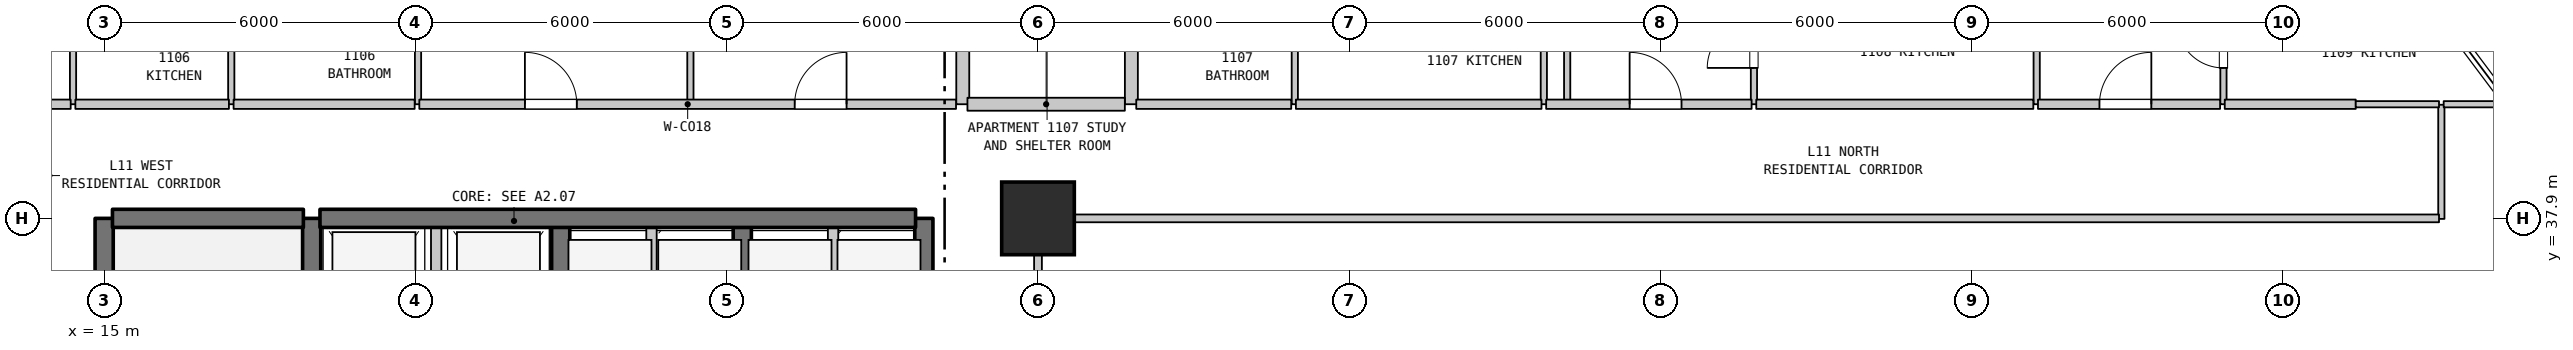
"""IFC4 building model, lengths in metres.
Left out: names, types, materials, properties, quantities, classifications, styles, units other than length and angle.
Written with IfcOpenShell. Run it as: python <this file> out.ifc"""

import sys

from ifc_helpers import new_model, si_unit, direction, frame, frame_2d, origin, origin_2d, place, context, subcontext, project, spatial, rectangle, extrude, element, fill, save


model = new_model("IFC4")
c1 = context("Model", 3, precision=1e-05, world=origin(), true_north=direction((0.0, 1.0)))
c2 = subcontext(c1, "Body", "Model", "MODEL_VIEW")
j1 = project(units=[si_unit("LENGTHUNIT", "METRE"), si_unit("PLANEANGLEUNIT", "RADIAN")], contexts=[c1])
p1 = place(None, origin())
s1 = spatial("IfcSite", under=j1, at=p1, CompositionType="ELEMENT")
p2 = place(p1, origin())
s2 = spatial("IfcBuilding", under=s1, at=p2, CompositionType="ELEMENT")
p3 = place(p2, frame((0.0, 0.0, 49.9)))
s3 = spatial("IfcBuildingStorey", under=s2, at=p3, CompositionType="ELEMENT", Elevation=49.9)
p4 = place(p3, frame((33.0, 37.9, 0.0), z_axis=(0.0, 0.0, 1.0), x_axis=(1.0, 0.0, 0.0)))
e1 = element("IfcColumn", 1, at=p4, inside=s3, PredefinedType="COLUMN", context=c2, shape_type="SweptSolid", body=[
    extrude(rectangle(XDim=1.4, YDim=1.4, at=origin_2d()), origin(), (0.0, 0.0, 1.0), 3.7),
])
p5 = place(p3, frame((14.4, 40.1, 0.0), z_axis=(0.0, 0.0, 1.0), x_axis=(0.0, 1.0, 0.0)))
e2 = element("IfcWall", 2, at=p5, inside=s3, PredefinedType="PARTITIONING", context=c2, shape_type="SweptSolid", body=[
    extrude(rectangle(XDim=2.3, YDim=0.12, at=frame_2d((1.15, 0.0))), origin(), (0.0, 0.0, 1.0), 3.385),
])
p6 = place(p3, frame((15.0, 31.1, 0.0), z_axis=(0.0, 0.0, 1.0), x_axis=(0.0, 1.0, 0.0)))
e3 = element("IfcWall", 3, at=p6, inside=s3, PredefinedType="SHEAR", context=c2, shape_type="SweptSolid", body=[
    extrude(rectangle(XDim=6.8, YDim=0.35, at=frame_2d((3.4, 0.0))), origin(), (0.0, 0.0, 1.0), 3.385),
])
p7 = place(p3, frame((17.45, 40.1, 0.0), z_axis=(0.0, 0.0, 1.0), x_axis=(0.0, 1.0, 0.0)))
e4 = element("IfcWall", 4, at=p7, inside=s3, PredefinedType="PARTITIONING", context=c2, shape_type="SweptSolid", body=[
    extrude(rectangle(XDim=2.3, YDim=0.12, at=frame_2d((1.15, 0.0))), origin(), (0.0, 0.0, 1.0), 3.385),
])
p8 = place(p3, frame((19.0, 35.0, 0.0), z_axis=(0.0, 0.0, 1.0), x_axis=(0.0, 1.0, 0.0)))
e5 = element("IfcWall", 5, at=p8, inside=s3, PredefinedType="SHEAR", context=c2, shape_type="SweptSolid", body=[
    extrude(rectangle(XDim=2.9, YDim=0.35, at=frame_2d((1.45, 0.0))), origin(), (0.0, 0.0, 1.0), 3.385),
])
p9 = place(p3, frame((21.05, 40.1, 0.0), z_axis=(0.0, 0.0, 1.0), x_axis=(0.0, 1.0, 0.0)))
e6 = element("IfcWall", 6, at=p9, inside=s3, PredefinedType="PARTITIONING", context=c2, shape_type="SweptSolid", body=[
    extrude(rectangle(XDim=2.3, YDim=0.12, at=frame_2d((1.15, 0.0))), origin(), (0.0, 0.0, 1.0), 3.025),
])
p10 = place(p3, frame((21.4, 35.0, 0.0), z_axis=(0.0, 0.0, 1.0), x_axis=(0.0, 1.0, 0.0)))
e7 = element("IfcWall", 7, at=p10, inside=s3, PredefinedType="STANDARD", context=c2, shape_type="SweptSolid", body=[
    extrude(rectangle(XDim=2.9, YDim=0.2, at=frame_2d((1.45, 0.0))), origin(), (0.0, 0.0, 1.0), 3.385),
])
p11 = place(p3, frame((23.8, 35.0, 0.0), z_axis=(0.0, 0.0, 1.0), x_axis=(0.0, 1.0, 0.0)))
e8 = element("IfcWall", 8, at=p11, inside=s3, PredefinedType="SHEAR", context=c2, shape_type="SweptSolid", body=[
    extrude(rectangle(XDim=2.9, YDim=0.35, at=frame_2d((1.45, 0.0))), origin(), (0.0, 0.0, 1.0), 3.385),
])
p12 = place(p3, frame((25.55, 35.0, 0.0), z_axis=(0.0, 0.0, 1.0), x_axis=(0.0, 1.0, 0.0)))
e9 = element("IfcWall", 9, at=p12, inside=s3, PredefinedType="STANDARD", context=c2, shape_type="SweptSolid", body=[
    extrude(rectangle(XDim=2.9, YDim=0.2, at=frame_2d((1.45, 0.0))), origin(), (0.0, 0.0, 1.0), 3.385),
])
p13 = place(p3, frame((26.3, 40.1, 0.0), z_axis=(0.0, 0.0, 1.0), x_axis=(0.0, 1.0, 0.0)))
e10 = element("IfcWall", 10, at=p13, inside=s3, PredefinedType="PARTITIONING", context=c2, shape_type="SweptSolid", body=[
    extrude(rectangle(XDim=2.05, YDim=0.12, at=frame_2d((1.025, 0.0))), origin(), (0.0, 0.0, 1.0), 3.385),
])
p14 = place(p3, frame((27.3, 35.0, 0.0), z_axis=(0.0, 0.0, 1.0), x_axis=(0.0, 1.0, 0.0)))
e11 = element("IfcWall", 11, at=p14, inside=s3, PredefinedType="SHEAR", context=c2, shape_type="SweptSolid", body=[
    extrude(rectangle(XDim=2.9, YDim=0.35, at=frame_2d((1.45, 0.0))), origin(), (0.0, 0.0, 1.0), 3.385),
])
p15 = place(p3, frame((29.05, 35.0, 0.0), z_axis=(0.0, 0.0, 1.0), x_axis=(0.0, 1.0, 0.0)))
e12 = element("IfcWall", 12, at=p15, inside=s3, PredefinedType="STANDARD", context=c2, shape_type="SweptSolid", body=[
    extrude(rectangle(XDim=2.9, YDim=0.2, at=frame_2d((1.45, 0.0))), origin(), (0.0, 0.0, 1.0), 3.385),
])
p16 = place(p3, frame((30.8, 35.0, 0.0), z_axis=(0.0, 0.0, 1.0), x_axis=(0.0, 1.0, 0.0)))
e13 = element("IfcWall", 13, at=p16, inside=s3, PredefinedType="SHEAR", context=c2, shape_type="SweptSolid", body=[
    extrude(rectangle(XDim=2.9, YDim=0.35, at=frame_2d((1.45, 0.0))), origin(), (0.0, 0.0, 1.0), 3.385),
])
p17 = place(p3, frame((31.55, 40.1, 0.0), z_axis=(0.0, 0.0, 1.0), x_axis=(0.0, 1.0, 0.0)))
e14 = element("IfcWall", 14, at=p17, inside=s3, PredefinedType="STANDARD", context=c2, shape_type="SweptSolid", body=[
    extrude(rectangle(XDim=2.3, YDim=0.25, at=frame_2d((1.15, 0.0))), origin(), (0.0, 0.0, 1.0), 3.385),
])
p18 = place(p3, frame((33.0, 27.91, 0.0), z_axis=(0.0, 0.0, 1.0), x_axis=(0.0, 1.0, 0.0)))
e15 = element("IfcWall", 15, at=p18, inside=s3, PredefinedType="STANDARD", context=c2, shape_type="SweptSolid", body=[
    extrude(rectangle(XDim=9.98, YDim=0.15, at=frame_2d((4.99, 0.0))), origin(), (0.0, 0.0, 1.0), 2.885),
])
p19 = place(p3, frame((34.8, 40.1, 0.0), z_axis=(0.0, 0.0, 1.0), x_axis=(0.0, 1.0, 0.0)))
e16 = element("IfcWall", 16, at=p19, inside=s3, PredefinedType="STANDARD", context=c2, shape_type="SweptSolid", body=[
    extrude(rectangle(XDim=2.3, YDim=0.25, at=frame_2d((1.15, 0.0))), origin(), (0.0, 0.0, 1.0), 3.385),
])
for number, where, z_axis, x_axis in (
    (17, (37.95, 40.1, 0.0), (0.0, 0.0, 1.0), (0.0, 1.0, 0.0)),
    (18, (42.75, 40.1, 0.0), (0.0, 0.0, 1.0), (0.0, 1.0, 0.0)),
):
    element("IfcWall", number, at=place(p3, frame(where, z_axis=z_axis, x_axis=x_axis)), inside=s3, PredefinedType="PARTITIONING", context=c2, shape_type="SweptSolid", body=[
        extrude(rectangle(XDim=2.3, YDim=0.12, at=frame_2d((1.15, 0.0))), origin(), (0.0, 0.0, 1.0), 3.385),
    ])
p20 = place(p3, frame((43.2, 40.1, 0.0), z_axis=(0.0, 0.0, 1.0), x_axis=(0.0, 1.0, 0.0)))
e19 = element("IfcWall", 19, at=p20, inside=s3, PredefinedType="PARTITIONING", context=c2, shape_type="SweptSolid", body=[
    extrude(rectangle(XDim=13.79, YDim=0.12, at=frame_2d((6.895, 0.0))), origin(), (0.0, 0.0, 1.0), 3.385),
])
p21 = place(p3, frame((46.8, 40.1, 0.0), z_axis=(0.0, 0.0, 1.0), x_axis=(0.0, 1.0, 0.0)))
e20 = element("IfcWall", 20, at=p21, inside=s3, PredefinedType="PARTITIONING", context=c2, shape_type="SweptSolid", body=[
    extrude(rectangle(XDim=2.3, YDim=0.12, at=frame_2d((1.15, 0.0))), origin(), (0.0, 0.0, 1.0), 3.385),
])
p22 = place(p21, frame((0.7, 0.0, 0.0)))
e21 = element("IfcOpeningElement", 21, at=p22, cuts=e20, PredefinedType="OPENING", context=c2, shape_type="SweptSolid", body=[
    extrude(rectangle(XDim=0.9, YDim=2.15, at=frame_2d((0.45, 1.075))), frame((0.0, 0.07, 0.0), z_axis=(0.0, -1.0, 0.0), x_axis=(1.0, 0.0, 0.0)), (0.0, 0.0, 1.0), 0.14),
])
p23 = place(p3, frame((52.25, 40.1, 0.0), z_axis=(0.0, 0.0, 1.0), x_axis=(0.0, 1.0, 0.0)))
e22 = element("IfcWall", 22, at=p23, inside=s3, PredefinedType="PARTITIONING", context=c2, shape_type="SweptSolid", body=[
    extrude(rectangle(XDim=2.3, YDim=0.12, at=frame_2d((1.15, 0.0))), origin(), (0.0, 0.0, 1.0), 3.385),
])
p24 = place(p3, frame((55.85, 40.1, 0.0), z_axis=(0.0, 0.0, 1.0), x_axis=(0.0, 1.0, 0.0)))
e23 = element("IfcWall", 23, at=p24, inside=s3, PredefinedType="PARTITIONING", context=c2, shape_type="SweptSolid", body=[
    extrude(rectangle(XDim=2.3, YDim=0.12, at=frame_2d((1.15, 0.0))), origin(), (0.0, 0.0, 1.0), 3.385),
])
p25 = place(p24, frame((0.7, 0.0, 0.0)))
e24 = element("IfcOpeningElement", 24, at=p25, cuts=e23, PredefinedType="OPENING", context=c2, shape_type="SweptSolid", body=[
    extrude(rectangle(XDim=0.9, YDim=2.15, at=frame_2d((0.45, 1.075))), frame((0.0, 0.07, 0.0), z_axis=(0.0, -1.0, 0.0), x_axis=(1.0, 0.0, 0.0)), (0.0, 0.0, 1.0), 0.14),
])
p26 = place(p3, frame((60.05, 37.89, 0.0), z_axis=(0.0, 0.0, 1.0), x_axis=(0.0, 1.0, 0.0)))
e25 = element("IfcWall", 25, at=p26, inside=s3, PredefinedType="PARTITIONING", context=c2, shape_type="SweptSolid", body=[
    extrude(rectangle(XDim=2.2, YDim=0.12, at=frame_2d((1.1, 0.0))), origin(), (0.0, 0.0, 1.0), 3.385),
])
p27 = place(p3, frame((15.16, 37.9, 0.0), z_axis=(0.0, 0.0, 1.0), x_axis=(1.0, 0.0, 0.0)))
e26 = element("IfcWall", 26, at=p27, inside=s3, PredefinedType="SHEAR", context=c2, shape_type="SweptSolid", body=[
    extrude(rectangle(XDim=3.68, YDim=0.35, at=frame_2d((1.84, 0.0))), origin(), (0.0, 0.0, 1.0), 3.385),
])
p28 = place(p3, frame((19.16, 37.9, 0.0), z_axis=(0.0, 0.0, 1.0), x_axis=(1.0, 0.0, 0.0)))
e27 = element("IfcWall", 27, at=p28, inside=s3, PredefinedType="SHEAR", context=c2, shape_type="SweptSolid", body=[
    extrude(rectangle(XDim=11.48, YDim=0.35, at=frame_2d((5.74, 0.0))), origin(), (0.0, 0.0, 1.0), 3.385),
])
p29 = place(p3, frame((33.07, 37.9, 0.0), z_axis=(0.0, 0.0, 1.0), x_axis=(1.0, 0.0, 0.0)))
e28 = element("IfcWall", 28, at=p29, inside=s3, PredefinedType="STANDARD", context=c2, shape_type="SweptSolid", body=[
    extrude(rectangle(XDim=26.935, YDim=0.15, at=frame_2d((13.467, 0.0))), origin(), (0.0, 0.0, 1.0), 3.385),
])
p30 = place(p3, frame((12.875, 40.1, 0.0), z_axis=(0.0, 0.0, 1.0), x_axis=(1.0, 0.0, 0.0)))
e29 = element("IfcWall", 29, at=p30, inside=s3, PredefinedType="STANDARD", context=c2, shape_type="SweptSolid", body=[
    extrude(rectangle(XDim=1.48, YDim=0.18, at=frame_2d((0.74, 0.0))), origin(), (0.0, 0.0, 1.0), 3.385),
])
p31 = place(p3, frame((14.445, 40.1, 0.0), z_axis=(0.0, 0.0, 1.0), x_axis=(1.0, 0.0, 0.0)))
e30 = element("IfcWall", 30, at=p31, inside=s3, PredefinedType="STANDARD", context=c2, shape_type="SweptSolid", body=[
    extrude(rectangle(XDim=2.96, YDim=0.18, at=frame_2d((1.48, 0.0))), origin(), (0.0, 0.0, 1.0), 3.385),
])
p32 = place(p3, frame((17.495, 40.1, 0.0), z_axis=(0.0, 0.0, 1.0), x_axis=(1.0, 0.0, 0.0)))
e31 = element("IfcWall", 31, at=p32, inside=s3, PredefinedType="STANDARD", context=c2, shape_type="SweptSolid", body=[
    extrude(rectangle(XDim=3.49, YDim=0.18, at=frame_2d((1.745, 0.0))), origin(), (0.0, 0.0, 1.0), 3.385),
])
p33 = place(p3, frame((21.075, 40.1, 0.0), z_axis=(0.0, 0.0, 1.0), x_axis=(1.0, 0.0, 0.0)))
e32 = element("IfcWall", 32, at=p33, inside=s3, PredefinedType="STANDARD", context=c2, shape_type="SweptSolid", body=[
    extrude(rectangle(XDim=10.345, YDim=0.18, at=frame_2d((5.172, 0.0))), origin(), (0.0, 0.0, 1.0), 3.385),
])
p34 = place(p33, frame((2.035, 0.0, 0.0)))
e33 = element("IfcOpeningElement", 33, at=p34, cuts=e32, PredefinedType="OPENING", context=c2, shape_type="SweptSolid", body=[
    extrude(rectangle(XDim=1.0, YDim=2.15, at=frame_2d((0.5, 1.075))), frame((0.0, 0.1, 0.0), z_axis=(0.0, -1.0, 0.0), x_axis=(1.0, 0.0, 0.0)), (0.0, 0.0, 1.0), 0.2),
])
p35 = place(p33, frame((7.235, 0.0, 0.0)))
e34 = element("IfcOpeningElement", 34, at=p35, cuts=e32, PredefinedType="OPENING", context=c2, shape_type="SweptSolid", body=[
    extrude(rectangle(XDim=1.0, YDim=2.15, at=frame_2d((0.5, 1.075))), frame((0.0, 0.1, 0.0), z_axis=(0.0, -1.0, 0.0), x_axis=(1.0, 0.0, 0.0)), (0.0, 0.0, 1.0), 0.2),
])
p36 = place(p3, frame((31.64, 40.1, 0.0), z_axis=(0.0, 0.0, 1.0), x_axis=(1.0, 0.0, 0.0)))
e35 = element("IfcWall", 35, at=p36, inside=s3, PredefinedType="STANDARD", context=c2, shape_type="SweptSolid", body=[
    extrude(rectangle(XDim=3.034, YDim=0.25, at=frame_2d((1.517, 0.0))), origin(), (0.0, 0.0, 1.0), 3.385),
])
p37 = place(p3, frame((34.894, 40.1, 0.0), z_axis=(0.0, 0.0, 1.0), x_axis=(1.0, 0.0, 0.0)))
e36 = element("IfcWall", 36, at=p37, inside=s3, PredefinedType="STANDARD", context=c2, shape_type="SweptSolid", body=[
    extrude(rectangle(XDim=2.987, YDim=0.18, at=frame_2d((1.494, 0.0))), origin(), (0.0, 0.0, 1.0), 3.385),
])
p38 = place(p3, frame((37.971, 40.1, 0.0), z_axis=(0.0, 0.0, 1.0), x_axis=(1.0, 0.0, 0.0)))
e37 = element("IfcWall", 37, at=p38, inside=s3, PredefinedType="STANDARD", context=c2, shape_type="SweptSolid", body=[
    extrude(rectangle(XDim=4.734, YDim=0.18, at=frame_2d((2.367, 0.0))), origin(), (0.0, 0.0, 1.0), 3.385),
])
p39 = place(p3, frame((42.795, 40.1, 0.0), z_axis=(0.0, 0.0, 1.0), x_axis=(1.0, 0.0, 0.0)))
e38 = element("IfcWall", 38, at=p39, inside=s3, PredefinedType="STANDARD", context=c2, shape_type="SweptSolid", body=[
    extrude(rectangle(XDim=3.96, YDim=0.18, at=frame_2d((1.98, 0.0))), origin(), (0.0, 0.0, 1.0), 3.385),
])
p40 = place(p39, frame((1.609, 0.0, 0.0)))
e39 = element("IfcOpeningElement", 39, at=p40, cuts=e38, PredefinedType="OPENING", context=c2, shape_type="SweptSolid", body=[
    extrude(rectangle(XDim=1.0, YDim=2.15, at=frame_2d((0.5, 1.075))), frame((0.0, 0.1, 0.0), z_axis=(0.0, -1.0, 0.0), x_axis=(1.0, 0.0, 0.0)), (0.0, 0.0, 1.0), 0.2),
])
p41 = place(p3, frame((46.845, 40.1, 0.0), z_axis=(0.0, 0.0, 1.0), x_axis=(1.0, 0.0, 0.0)))
e40 = element("IfcWall", 40, at=p41, inside=s3, PredefinedType="STANDARD", context=c2, shape_type="SweptSolid", body=[
    extrude(rectangle(XDim=5.34, YDim=0.18, at=frame_2d((2.67, 0.0))), origin(), (0.0, 0.0, 1.0), 3.385),
])
p42 = place(p3, frame((52.275, 40.1, 0.0), z_axis=(0.0, 0.0, 1.0), x_axis=(1.0, 0.0, 0.0)))
e41 = element("IfcWall", 41, at=p42, inside=s3, PredefinedType="STANDARD", context=c2, shape_type="SweptSolid", body=[
    extrude(rectangle(XDim=3.51, YDim=0.18, at=frame_2d((1.755, 0.0))), origin(), (0.0, 0.0, 1.0), 3.385),
])
p43 = place(p42, frame((1.185, 0.0, 0.0)))
e42 = element("IfcOpeningElement", 42, at=p43, cuts=e41, PredefinedType="OPENING", context=c2, shape_type="SweptSolid", body=[
    extrude(rectangle(XDim=1.0, YDim=2.15, at=frame_2d((0.5, 1.075))), frame((0.0, 0.1, 0.0), z_axis=(0.0, -1.0, 0.0), x_axis=(1.0, 0.0, 0.0)), (0.0, 0.0, 1.0), 0.2),
])
p44 = place(p3, frame((55.875, 40.1, 0.0), z_axis=(0.0, 0.0, 1.0), x_axis=(1.0, 0.0, 0.0)))
e43 = element("IfcWall", 43, at=p44, inside=s3, PredefinedType="STANDARD", context=c2, shape_type="SweptSolid", body=[
    extrude(rectangle(XDim=2.525, YDim=0.18, at=frame_2d((1.262, 0.0))), origin(), (0.0, 0.0, 1.0), 3.385),
])
p45 = place(p3, frame((58.4, 40.1, 0.0), z_axis=(0.0, 0.0, 1.0), x_axis=(1.0, 0.0, 0.0)))
e44 = element("IfcWall", 44, at=p45, inside=s3, PredefinedType="PARTITIONING", context=c2, shape_type="SweptSolid", body=[
    extrude(rectangle(XDim=1.605, YDim=0.12, at=frame_2d((0.802, 0.0))), origin(), (0.0, 0.0, 1.0), 3.385),
])
p46 = place(p3, frame((60.095, 40.1, 0.0), z_axis=(0.0, 0.0, 1.0), x_axis=(1.0, 0.0, 0.0)))
e45 = element("IfcWall", 45, at=p46, inside=s3, PredefinedType="PARTITIONING", context=c2, shape_type="SweptSolid", body=[
    extrude(rectangle(XDim=1.245, YDim=0.12, at=frame_2d((0.623, 0.0))), origin(), (0.0, 0.0, 1.0), 3.385),
])
p47 = place(p22, origin())
e46 = element("IfcDoor", 46, at=p47, inside=s3, OperationType="SINGLE_SWING_LEFT", PredefinedType="DOOR", context=c2, shape_type="SweptSolid", body=[
    extrude(rectangle(XDim=0.9, YDim=2.15, at=frame_2d((0.45, 1.075))), frame((0.0, 0.025, 0.0), z_axis=(0.0, -1.0, 0.0), x_axis=(1.0, 0.0, 0.0)), (0.0, 0.0, 1.0), 0.05),
])
fill(e21, e46)
p48 = place(p25, origin())
e47 = element("IfcDoor", 47, at=p48, inside=s3, OperationType="SINGLE_SWING_RIGHT", PredefinedType="DOOR", context=c2, shape_type="SweptSolid", body=[
    extrude(rectangle(XDim=0.9, YDim=2.15, at=frame_2d((0.45, 1.075))), frame((0.0, 0.025, 0.0), z_axis=(0.0, -1.0, 0.0), x_axis=(1.0, 0.0, 0.0)), (0.0, 0.0, 1.0), 0.05),
])
fill(e24, e47)
p49 = place(p34, origin())
e48 = element("IfcDoor", 48, at=p49, inside=s3, OperationType="SINGLE_SWING_LEFT", PredefinedType="DOOR", context=c2, shape_type="SweptSolid", body=[
    extrude(rectangle(XDim=1.0, YDim=2.15, at=frame_2d((0.5, 1.075))), frame((0.0, 0.025, 0.0), z_axis=(0.0, -1.0, 0.0), x_axis=(1.0, 0.0, 0.0)), (0.0, 0.0, 1.0), 0.05),
])
fill(e33, e48)
p50 = place(p35, origin())
e49 = element("IfcDoor", 49, at=p50, inside=s3, OperationType="SINGLE_SWING_RIGHT", PredefinedType="DOOR", context=c2, shape_type="SweptSolid", body=[
    extrude(rectangle(XDim=1.0, YDim=2.15, at=frame_2d((0.5, 1.075))), frame((0.0, 0.025, 0.0), z_axis=(0.0, -1.0, 0.0), x_axis=(1.0, 0.0, 0.0)), (0.0, 0.0, 1.0), 0.05),
])
fill(e34, e49)
p51 = place(p40, origin())
e50 = element("IfcDoor", 50, at=p51, inside=s3, OperationType="SINGLE_SWING_LEFT", PredefinedType="DOOR", context=c2, shape_type="SweptSolid", body=[
    extrude(rectangle(XDim=1.0, YDim=2.15, at=frame_2d((0.5, 1.075))), frame((0.0, 0.025, 0.0), z_axis=(0.0, -1.0, 0.0), x_axis=(1.0, 0.0, 0.0)), (0.0, 0.0, 1.0), 0.05),
])
fill(e39, e50)
p52 = place(p43, origin())
e51 = element("IfcDoor", 51, at=p52, inside=s3, OperationType="SINGLE_SWING_RIGHT", PredefinedType="DOOR", context=c2, shape_type="SweptSolid", body=[
    extrude(rectangle(XDim=1.0, YDim=2.15, at=frame_2d((0.5, 1.075))), frame((0.0, 0.025, 0.0), z_axis=(0.0, -1.0, 0.0), x_axis=(1.0, 0.0, 0.0)), (0.0, 0.0, 1.0), 0.05),
])
fill(e42, e51)
save(model, sys.argv[1])
